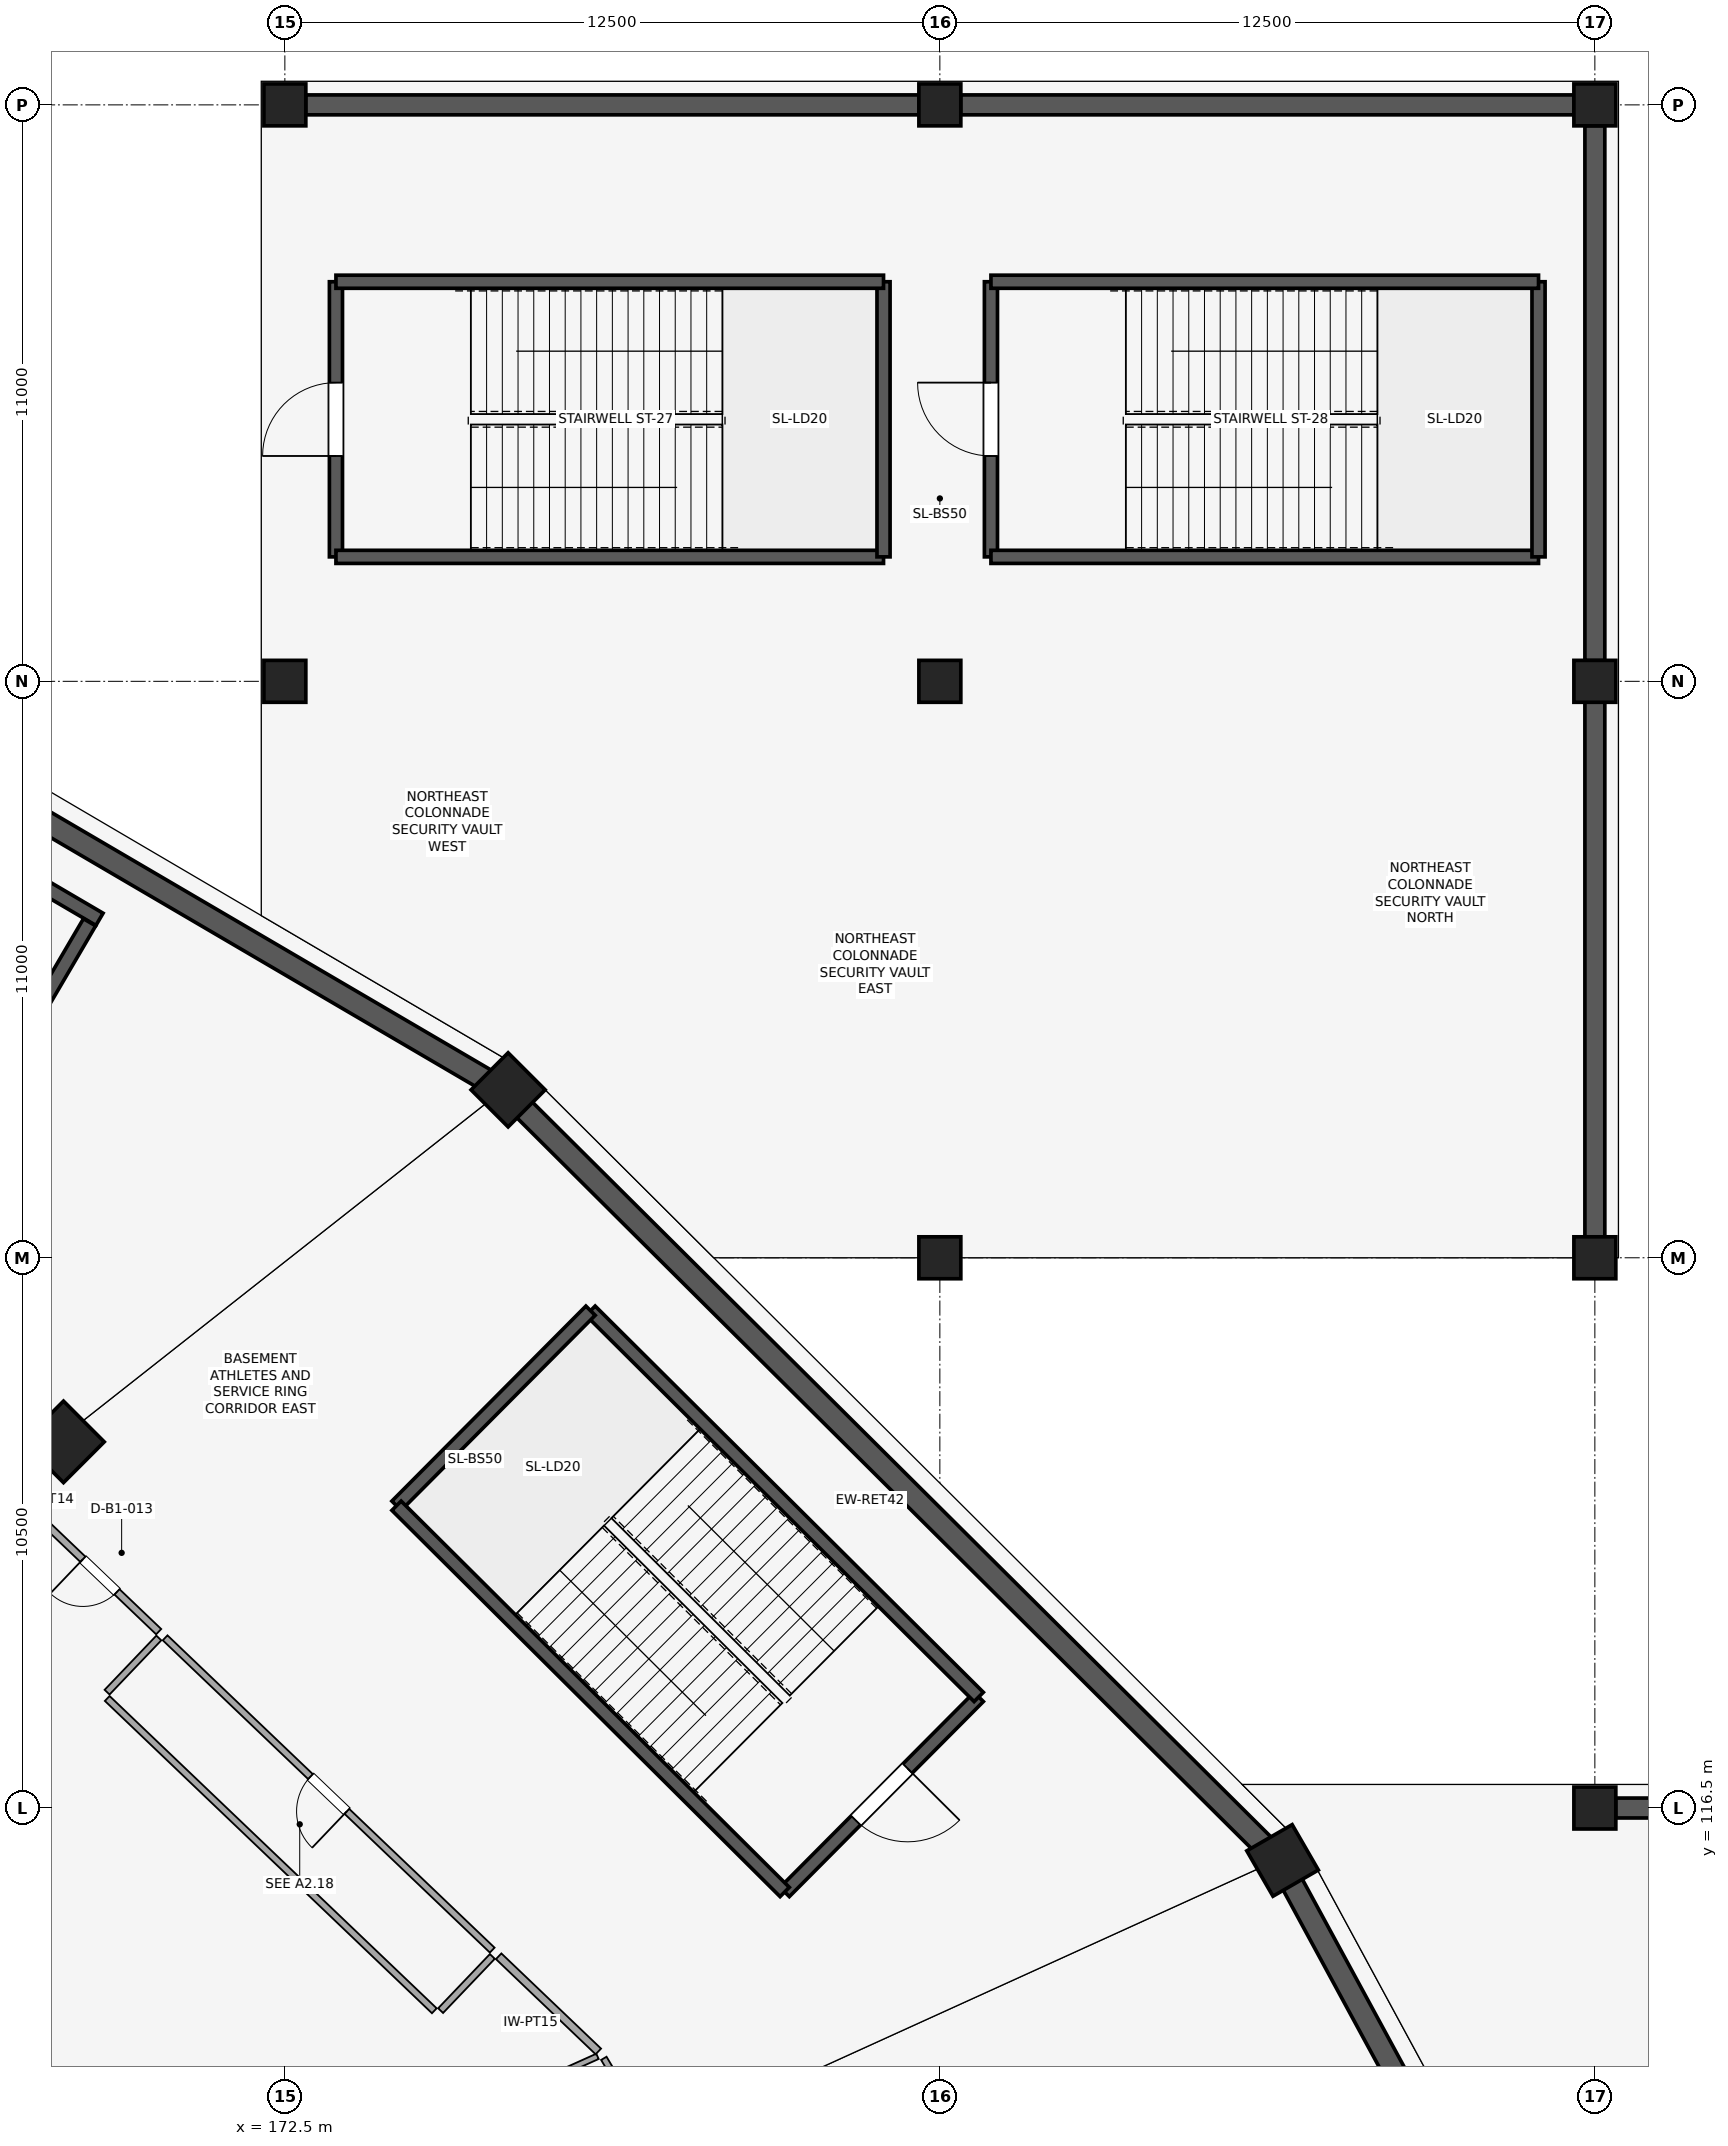
"""IFC4 building model, lengths in metres.
Left out: names, types, materials, properties, quantities, classifications, styles, units other than length and angle.
Written with IfcOpenShell. Run it as: python <this file> out.ifc"""

import sys

from ifc_helpers import new_model, si_unit, direction, frame, frame_2d, origin, origin_2d, place, context, subcontext, project, spatial, rectangle, extrude, element, fill, save


model = new_model("IFC4")
c1 = context("Model", 3, precision=1e-05, world=origin(), true_north=direction((0.0, 1.0)))
c2 = subcontext(c1, "Body", "Model", "MODEL_VIEW")
j1 = project(units=[si_unit("LENGTHUNIT", "METRE"), si_unit("PLANEANGLEUNIT", "RADIAN")], contexts=[c1])
p1 = place(None, origin())
s1 = spatial("IfcSite", under=j1, at=p1, CompositionType="ELEMENT")
p2 = place(p1, origin())
s2 = spatial("IfcBuilding", under=s1, at=p2, CompositionType="ELEMENT")
p3 = place(p2, frame((0.0, 0.0, -5.4)))
s3 = spatial("IfcBuildingStorey", under=s2, at=p3, CompositionType="ELEMENT", Elevation=-5.4)
p4 = place(p3, frame((168.276, 123.487, 0.0), z_axis=(0.0, 0.0, 1.0), x_axis=(0.707106781187, 0.707106781187, 0.0)))
e1 = element("IfcColumn", 1, at=p4, inside=s3, PredefinedType="COLUMN", context=c2, shape_type="SweptSolid", body=[
    extrude(rectangle(XDim=1.1, YDim=1.1, at=origin_2d()), origin(), (0.0, 0.0, 1.0), 5.4),
])
for number, where, z_axis, x_axis in (
    (2, (191.54, 115.5, 0.0), (0.0, 0.0, 1.0), (0.866, 0.5, 0.0)),
    (3, (176.761, 130.205, 0.0), (0.0, 0.0, 1.0), (0.707, 0.707, 0.0)),
):
    element("IfcColumn", number, at=place(p3, frame(where, z_axis=z_axis, x_axis=x_axis)), inside=s3, PredefinedType="COLUMN", context=c2, shape_type="SweptSolid", body=[
        extrude(rectangle(XDim=1.0, YDim=1.0, at=origin_2d()), origin(), (0.0, 0.0, 1.0), 5.4),
    ])
for number, where, z_axis, x_axis in (
    (4, (172.5, 138.0, 0.0), (0.0, 0.0, 1.0), (1.0, 0.0, 0.0)),
    (5, (172.5, 149.0, 0.0), (0.0, 0.0, 1.0), (1.0, 0.0, 0.0)),
    (6, (185.0, 127.0, 0.0), (0.0, 0.0, 1.0), (1.0, 0.0, 0.0)),
    (7, (185.0, 138.0, 0.0), (0.0, 0.0, 1.0), (1.0, 0.0, 0.0)),
    (8, (185.0, 149.0, 0.0), (0.0, 0.0, 1.0), (1.0, 0.0, 0.0)),
    (9, (197.5, 116.5, 0.0), (0.0, 0.0, 1.0), (1.0, 0.0, 0.0)),
    (10, (197.5, 127.0, 0.0), (0.0, 0.0, 1.0), (1.0, 0.0, 0.0)),
    (11, (197.5, 138.0, 0.0), (0.0, 0.0, 1.0), (1.0, 0.0, 0.0)),
    (12, (197.5, 149.0, 0.0), (0.0, 0.0, 1.0), (1.0, 0.0, 0.0)),
):
    element("IfcColumn", number, at=place(p3, frame(where, z_axis=z_axis, x_axis=x_axis)), inside=s3, PredefinedType="COLUMN", context=c2, shape_type="SweptSolid", body=[
        extrude(rectangle(XDim=0.8, YDim=0.8, at=origin_2d()), origin(), (0.0, 0.0, 1.0), 5.4),
    ])
p5 = place(p3, frame((200.783, 98.363, 0.0), z_axis=(0.0, 0.0, 1.0), x_axis=(-0.476947954388, 0.878931538178, 0.0)))
e13 = element("IfcWall", 13, at=p5, inside=s3, PredefinedType="SOLIDWALL", context=c2, shape_type="SweptSolid", body=[
    extrude(rectangle(XDim=19.469, YDim=0.42, at=frame_2d((9.734, 0.0))), origin(), (0.0, 0.0, 1.0), 4.45),
])
p6 = place(p3, frame((191.497, 115.475, 0.0), z_axis=(0.0, 0.0, 1.0), x_axis=(-0.708961581499, 0.705247102765, 0.0)))
e14 = element("IfcWall", 14, at=p6, inside=s3, PredefinedType="SOLIDWALL", context=c2, shape_type="SweptSolid", body=[
    extrude(rectangle(XDim=20.835, YDim=0.42, at=frame_2d((10.418, 0.0))), origin(), (0.0, 0.0, 1.0), 4.45),
])
p7 = place(p3, frame((176.726, 130.169, 0.0), z_axis=(0.0, 0.0, 1.0), x_axis=(-0.862881315776, 0.505406603523, 0.0)))
e15 = element("IfcWall", 15, at=p7, inside=s3, PredefinedType="SOLIDWALL", context=c2, shape_type="SweptSolid", body=[
    extrude(rectangle(XDim=22.31, YDim=0.42, at=frame_2d((11.155, 0.0))), origin(), (0.0, 0.0, 1.0), 4.45),
])
for number, where, z_axis, x_axis in (
    (16, (197.897, 116.5, 0.0), (0.0, 0.0, 1.0), (1.0, 0.0, 0.0)),
    (17, (172.897, 149.0, 0.0), (0.0, 0.0, 1.0), (1.0, 0.0, 0.0)),
    (18, (185.397, 149.0, 0.0), (0.0, 0.0, 1.0), (1.0, 0.0, 0.0)),
):
    element("IfcWall", number, at=place(p3, frame(where, z_axis=z_axis, x_axis=x_axis)), inside=s3, PredefinedType="SOLIDWALL", context=c2, shape_type="SweptSolid", body=[
        extrude(rectangle(XDim=11.706, YDim=0.38, at=frame_2d((5.853, 0.0))), origin(), (0.0, 0.0, 1.0), 4.43),
    ])
for number, where, z_axis, x_axis in (
    (19, (197.5, 127.397, 0.0), (0.0, 0.0, 1.0), (0.0, 1.0, 0.0)),
    (20, (197.5, 138.397, 0.0), (0.0, 0.0, 1.0), (0.0, 1.0, 0.0)),
):
    element("IfcWall", number, at=place(p3, frame(where, z_axis=z_axis, x_axis=x_axis)), inside=s3, PredefinedType="SOLIDWALL", context=c2, shape_type="SweptSolid", body=[
        extrude(rectangle(XDim=10.206, YDim=0.38, at=frame_2d((5.103, 0.0))), origin(), (0.0, 0.0, 1.0), 4.43),
    ])
p8 = place(p3, frame((182.039, 114.898, 0.0), z_axis=(0.0, 0.0, 1.0), x_axis=(0.705314141126, 0.708894888067, 0.0)))
e21 = element("IfcWall", 21, at=p8, inside=s3, PredefinedType="SHEAR", context=c2, shape_type="SweptSolid", body=[
    extrude(rectangle(XDim=5.25, YDim=0.25, at=frame_2d((2.625, 0.0))), origin(), (0.0, 0.0, 1.0), 5.05),
])
p9 = place(p8, frame((1.925, 0.0, 0.0)))
e22 = element("IfcOpeningElement", 22, at=p9, cuts=e21, PredefinedType="OPENING", context=c2, shape_type="SweptSolid", body=[
    extrude(rectangle(XDim=1.4, YDim=2.2, at=frame_2d((0.7, 1.1))), frame((0.0, 0.135, 0.0), z_axis=(0.0, -1.0, 0.0), x_axis=(1.0, 0.0, 0.0)), (0.0, 0.0, 1.0), 0.27),
])
p10 = place(p3, frame((185.742, 118.62, 0.0), z_axis=(0.0, 0.0, 1.0), x_axis=(-0.708891762409, 0.705317282639, 0.0)))
e23 = element("IfcWall", 23, at=p10, inside=s3, PredefinedType="SHEAR", context=c2, shape_type="SweptSolid", body=[
    extrude(rectangle(XDim=10.45, YDim=0.25, at=frame_2d((5.225, 0.0))), origin(), (0.0, 0.0, 1.0), 5.05),
])
p11 = place(p3, frame((178.334, 125.99, 0.0), z_axis=(0.0, 0.0, 1.0), x_axis=(-0.705314141126, -0.708894888067, 0.0)))
e24 = element("IfcWall", 24, at=p11, inside=s3, PredefinedType="SHEAR", context=c2, shape_type="SweptSolid", body=[
    extrude(rectangle(XDim=5.25, YDim=0.25, at=frame_2d((2.625, 0.0))), origin(), (0.0, 0.0, 1.0), 5.05),
])
p12 = place(p3, frame((174.631, 122.269, 0.0), z_axis=(0.0, 0.0, 1.0), x_axis=(0.708891762409, -0.705317282639, 0.0)))
e25 = element("IfcWall", 25, at=p12, inside=s3, PredefinedType="SHEAR", context=c2, shape_type="SweptSolid", body=[
    extrude(rectangle(XDim=10.45, YDim=0.25, at=frame_2d((5.225, 0.0))), origin(), (0.0, 0.0, 1.0), 5.05),
])
p13 = place(p3, frame((173.475, 145.625, 0.0), z_axis=(0.0, 0.0, 1.0), x_axis=(0.0, -1.0, 0.0)))
e26 = element("IfcWall", 26, at=p13, inside=s3, PredefinedType="SHEAR", context=c2, shape_type="SweptSolid", body=[
    extrude(rectangle(XDim=5.25, YDim=0.25, at=frame_2d((2.625, 0.0))), origin(), (0.0, 0.0, 1.0), 5.05),
])
p14 = place(p13, frame((1.925, 0.0, 0.0)))
e27 = element("IfcOpeningElement", 27, at=p14, cuts=e26, PredefinedType="OPENING", context=c2, shape_type="SweptSolid", body=[
    extrude(rectangle(XDim=1.4, YDim=2.2, at=frame_2d((0.7, 1.1))), frame((0.0, 0.135, 0.0), z_axis=(0.0, -1.0, 0.0), x_axis=(1.0, 0.0, 0.0)), (0.0, 0.0, 1.0), 0.27),
])
p15 = place(p3, frame((173.475, 140.375, 0.0), z_axis=(0.0, 0.0, 1.0), x_axis=(1.0, 0.0, 0.0)))
e28 = element("IfcWall", 28, at=p15, inside=s3, PredefinedType="SHEAR", context=c2, shape_type="SweptSolid", body=[
    extrude(rectangle(XDim=10.45, YDim=0.25, at=frame_2d((5.225, 0.0))), origin(), (0.0, 0.0, 1.0), 5.05),
])
p16 = place(p3, frame((183.925, 140.375, 0.0), z_axis=(0.0, 0.0, 1.0), x_axis=(0.0, 1.0, 0.0)))
e29 = element("IfcWall", 29, at=p16, inside=s3, PredefinedType="SHEAR", context=c2, shape_type="SweptSolid", body=[
    extrude(rectangle(XDim=5.25, YDim=0.25, at=frame_2d((2.625, 0.0))), origin(), (0.0, 0.0, 1.0), 5.05),
])
p17 = place(p3, frame((183.925, 145.625, 0.0), z_axis=(0.0, 0.0, 1.0), x_axis=(-1.0, 0.0, 0.0)))
e30 = element("IfcWall", 30, at=p17, inside=s3, PredefinedType="SHEAR", context=c2, shape_type="SweptSolid", body=[
    extrude(rectangle(XDim=10.45, YDim=0.25, at=frame_2d((5.225, 0.0))), origin(), (0.0, 0.0, 1.0), 5.05),
])
p18 = place(p3, frame((185.975, 145.625, 0.0), z_axis=(0.0, 0.0, 1.0), x_axis=(0.0, -1.0, 0.0)))
e31 = element("IfcWall", 31, at=p18, inside=s3, PredefinedType="SHEAR", context=c2, shape_type="SweptSolid", body=[
    extrude(rectangle(XDim=5.25, YDim=0.25, at=frame_2d((2.625, 0.0))), origin(), (0.0, 0.0, 1.0), 5.05),
])
p19 = place(p18, frame((1.925, 0.0, 0.0)))
e32 = element("IfcOpeningElement", 32, at=p19, cuts=e31, PredefinedType="OPENING", context=c2, shape_type="SweptSolid", body=[
    extrude(rectangle(XDim=1.4, YDim=2.2, at=frame_2d((0.7, 1.1))), frame((0.0, 0.135, 0.0), z_axis=(0.0, -1.0, 0.0), x_axis=(1.0, 0.0, 0.0)), (0.0, 0.0, 1.0), 0.27),
])
p20 = place(p3, frame((185.975, 140.375, 0.0), z_axis=(0.0, 0.0, 1.0), x_axis=(1.0, 0.0, 0.0)))
e33 = element("IfcWall", 33, at=p20, inside=s3, PredefinedType="SHEAR", context=c2, shape_type="SweptSolid", body=[
    extrude(rectangle(XDim=10.45, YDim=0.25, at=frame_2d((5.225, 0.0))), origin(), (0.0, 0.0, 1.0), 5.05),
])
p21 = place(p3, frame((196.425, 140.375, 0.0), z_axis=(0.0, 0.0, 1.0), x_axis=(0.0, 1.0, 0.0)))
e34 = element("IfcWall", 34, at=p21, inside=s3, PredefinedType="SHEAR", context=c2, shape_type="SweptSolid", body=[
    extrude(rectangle(XDim=5.25, YDim=0.25, at=frame_2d((2.625, 0.0))), origin(), (0.0, 0.0, 1.0), 5.05),
])
p22 = place(p3, frame((196.425, 145.625, 0.0), z_axis=(0.0, 0.0, 1.0), x_axis=(-1.0, 0.0, 0.0)))
e35 = element("IfcWall", 35, at=p22, inside=s3, PredefinedType="SHEAR", context=c2, shape_type="SweptSolid", body=[
    extrude(rectangle(XDim=10.45, YDim=0.25, at=frame_2d((5.225, 0.0))), origin(), (0.0, 0.0, 1.0), 5.05),
])
p23 = place(p3, frame((168.963, 133.459, 0.0), z_axis=(0.0, 0.0, 1.0), x_axis=(-0.862865684113, 0.505433290534, 0.0)))
e36 = element("IfcWall", 36, at=p23, inside=s3, PredefinedType="SHEAR", context=c2, shape_type="SweptSolid", body=[
    extrude(rectangle(XDim=7.4, YDim=0.27, at=frame_2d((3.7, 0.0))), origin(), (0.0, 0.0, 1.0), 5.05),
])
p24 = place(p3, frame((168.773, 133.402, 0.0), z_axis=(0.0, 0.0, 1.0), x_axis=(-0.505465660416, -0.862846722275, 0.0)))
e37 = element("IfcWall", 37, at=p24, inside=s3, PredefinedType="SHEAR", context=c2, shape_type="SweptSolid", body=[
    extrude(rectangle(XDim=2.74, YDim=0.27, at=frame_2d((1.37, 0.0))), origin(), (0.0, 0.0, 1.0), 5.05),
])
p25 = place(p3, frame((187.294, 97.092, 0.0), z_axis=(0.0, 0.0, 1.0), x_axis=(-0.51138201062, 0.859353500728, 0.0)))
e38 = element("IfcWall", 38, at=p25, inside=s3, PredefinedType="PARTITIONING", context=c2, shape_type="SweptSolid", body=[
    extrude(rectangle(XDim=17.026, YDim=0.12, at=frame_2d((8.513, 0.0))), origin(), (0.0, 0.0, 1.0), 3.8),
])
p26 = place(p25, frame((8.063, 0.0, 0.0)))
e39 = element("IfcOpeningElement", 39, at=p26, cuts=e38, PredefinedType="OPENING", context=c2, shape_type="SweptSolid", body=[
    extrude(rectangle(XDim=0.9, YDim=2.1, at=frame_2d((0.45, 1.05))), frame((0.0, 0.07, 0.0), z_axis=(0.0, -1.0, 0.0), x_axis=(1.0, 0.0, 0.0)), (0.0, 0.0, 1.0), 0.14),
])
p27 = place(p3, frame((155.834, 101.57, 0.0), z_axis=(0.0, 0.0, 1.0), x_axis=(0.911823751445, 0.410581838738, 0.0)))
e40 = element("IfcWall", 40, at=p27, inside=s3, PredefinedType="PARTITIONING", context=c2, shape_type="SweptSolid", body=[
    extrude(rectangle(XDim=24.821, YDim=0.11, at=frame_2d((12.41, 0.0))), origin(), (0.0, 0.0, 1.0), 3.8),
])
p28 = place(p3, frame((176.457, 113.788, 0.0), z_axis=(0.0, 0.0, 1.0), x_axis=(-0.723282965578, 0.69055177337, 0.0)))
e41 = element("IfcWall", 41, at=p28, inside=s3, PredefinedType="PARTITIONING", context=c2, shape_type="SweptSolid", body=[
    extrude(rectangle(XDim=8.63, YDim=0.13, at=frame_2d((4.315, 0.0))), origin(), (0.0, 0.0, 1.0), 3.8),
])
p29 = place(p28, frame((3.835, 0.0, 0.0)))
e42 = element("IfcOpeningElement", 42, at=p29, cuts=e41, PredefinedType="OPENING", context=c2, shape_type="SweptSolid", body=[
    extrude(rectangle(XDim=0.96, YDim=2.24, at=frame_2d((0.48, 1.12))), frame((0.0, 0.075, 0.0), z_axis=(0.0, -1.0, 0.0), x_axis=(1.0, 0.0, 0.0)), (0.0, 0.0, 1.0), 0.15),
])
p30 = place(p3, frame((175.352, 112.631, 0.0), z_axis=(0.0, 0.0, 1.0), x_axis=(-0.723310584954, 0.690522843716, 0.0)))
e43 = element("IfcWall", 43, at=p30, inside=s3, PredefinedType="PARTITIONING", context=c2, shape_type="SweptSolid", body=[
    extrude(rectangle(XDim=8.63, YDim=0.13, at=frame_2d((4.315, 0.0))), origin(), (0.0, 0.0, 1.0), 3.8),
])
p31 = place(p3, frame((176.46, 113.668, 0.0), z_axis=(0.0, 0.0, 1.0), x_axis=(-0.690528527034, -0.723305159219, 0.0)))
e44 = element("IfcWall", 44, at=p31, inside=s3, PredefinedType="PARTITIONING", context=c2, shape_type="SweptSolid", body=[
    extrude(rectangle(XDim=1.43, YDim=0.13, at=frame_2d((0.715, 0.0))), origin(), (0.0, 0.0, 1.0), 3.8),
])
p32 = place(p3, frame((170.095, 119.745, 0.0), z_axis=(0.0, 0.0, 1.0), x_axis=(-0.690524478899, -0.723309023891, 0.0)))
e45 = element("IfcWall", 45, at=p32, inside=s3, PredefinedType="PARTITIONING", context=c2, shape_type="SweptSolid", body=[
    extrude(rectangle(XDim=1.43, YDim=0.13, at=frame_2d((0.715, 0.0))), origin(), (0.0, 0.0, 1.0), 3.8),
])
p33 = place(p3, frame((178.482, 111.855, 0.0), z_axis=(0.0, 0.0, 1.0), x_axis=(-0.723347113938, 0.690484578218, 0.0)))
e46 = element("IfcWall", 46, at=p33, inside=s3, PredefinedType="PARTITIONING", context=c2, shape_type="SweptSolid", body=[
    extrude(rectangle(XDim=2.63, YDim=0.15, at=frame_2d((1.315, 0.0))), origin(), (0.0, 0.0, 1.0), 3.8),
])
p34 = place(p3, frame((170.092, 119.865, 0.0), z_axis=(0.0, 0.0, 1.0), x_axis=(-0.723287562658, 0.690546958363, 0.0)))
e47 = element("IfcWall", 47, at=p34, inside=s3, PredefinedType="PARTITIONING", context=c2, shape_type="SweptSolid", body=[
    extrude(rectangle(XDim=4.974, YDim=0.14, at=frame_2d((2.487, 0.0))), origin(), (0.0, 0.0, 1.0), 3.8),
])
p35 = place(p34, frame((1.1, 0.0, 0.0)))
e48 = element("IfcOpeningElement", 48, at=p35, cuts=e47, PredefinedType="OPENING", context=c2, shape_type="SweptSolid", body=[
    extrude(rectangle(XDim=0.9, YDim=2.38, at=frame_2d((0.45, 1.19))), frame((0.0, 0.08, 0.0), z_axis=(0.0, -1.0, 0.0), x_axis=(1.0, 0.0, 0.0)), (0.0, 0.0, 1.0), 0.16),
])
p36 = place(p9, frame((1.4, 0.0, 0.0), z_axis=(0.0, 0.0, 1.0), x_axis=(-1.0, 0.0, 0.0)))
e49 = element("IfcDoor", 49, at=p36, inside=s3, OperationType="SINGLE_SWING_LEFT", PredefinedType="DOOR", context=c2, shape_type="SweptSolid", body=[
    extrude(rectangle(XDim=1.4, YDim=2.2, at=frame_2d((0.7, 1.1))), frame((0.0, 0.025, 0.0), z_axis=(0.0, -1.0, 0.0), x_axis=(1.0, 0.0, 0.0)), (0.0, 0.0, 1.0), 0.05),
])
fill(e22, e49)
p37 = place(p14, frame((1.4, 0.0, 0.0), z_axis=(0.0, 0.0, 1.0), x_axis=(-1.0, 0.0, 0.0)))
e50 = element("IfcDoor", 50, at=p37, inside=s3, OperationType="SINGLE_SWING_LEFT", PredefinedType="DOOR", context=c2, shape_type="SweptSolid", body=[
    extrude(rectangle(XDim=1.4, YDim=2.2, at=frame_2d((0.7, 1.1))), frame((0.0, 0.025, 0.0), z_axis=(0.0, -1.0, 0.0), x_axis=(1.0, 0.0, 0.0)), (0.0, 0.0, 1.0), 0.05),
])
fill(e27, e50)
p38 = place(p19, frame((1.4, 0.0, 0.0), z_axis=(0.0, 0.0, 1.0), x_axis=(-1.0, 0.0, 0.0)))
e51 = element("IfcDoor", 51, at=p38, inside=s3, OperationType="SINGLE_SWING_RIGHT", PredefinedType="DOOR", context=c2, shape_type="SweptSolid", body=[
    extrude(rectangle(XDim=1.4, YDim=2.2, at=frame_2d((0.7, 1.1))), frame((0.0, 0.025, 0.0), z_axis=(0.0, -1.0, 0.0), x_axis=(1.0, 0.0, 0.0)), (0.0, 0.0, 1.0), 0.05),
])
fill(e32, e51)
p39 = place(p29, origin())
e52 = element("IfcDoor", 52, at=p39, inside=s3, OperationType="SINGLE_SWING_LEFT", PredefinedType="DOOR", context=c2, shape_type="SweptSolid", body=[
    extrude(rectangle(XDim=0.96, YDim=2.24, at=frame_2d((0.48, 1.12))), frame((0.0, 0.025, 0.0), z_axis=(0.0, -1.0, 0.0), x_axis=(1.0, 0.0, 0.0)), (0.0, 0.0, 1.0), 0.05),
])
fill(e42, e52)
p40 = place(p35, origin())
e53 = element("IfcDoor", 53, at=p40, inside=s3, OperationType="SINGLE_SWING_RIGHT", PredefinedType="DOOR", context=c2, shape_type="SweptSolid", body=[
    extrude(rectangle(XDim=0.9, YDim=2.38, at=frame_2d((0.45, 1.19))), frame((0.0, 0.025, 0.0), z_axis=(0.0, -1.0, 0.0), x_axis=(1.0, 0.0, 0.0)), (0.0, 0.0, 1.0), 0.05),
])
fill(e48, e53)
save(model, sys.argv[1])
